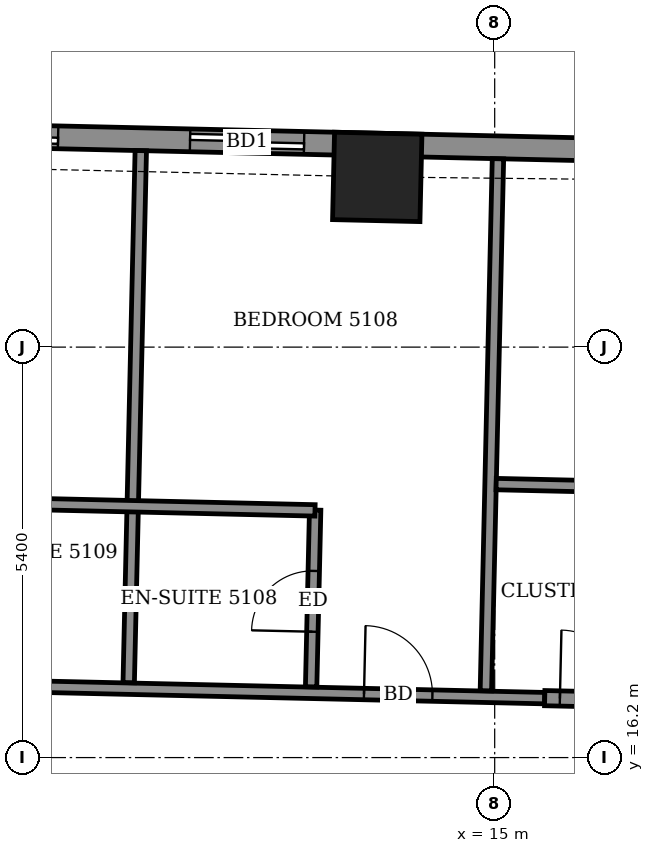
"""IFC4 building model, lengths in metres.
Left out: names, types, materials, properties, quantities, classifications, styles, units other than length and angle.
Written with IfcOpenShell. Run it as: python <this file> out.ifc"""

import sys

from ifc_helpers import new_model, si_unit, direction, frame, frame_2d, origin, origin_2d, place, context, subcontext, project, spatial, rectangle, extrude, element, fill, save


model = new_model("IFC4")
c1 = context("Model", 3, precision=1e-05, world=origin(), true_north=direction((0.0, 1.0)))
c2 = subcontext(c1, "Body", "Model", "MODEL_VIEW")
j1 = project(units=[si_unit("LENGTHUNIT", "METRE"), si_unit("PLANEANGLEUNIT", "RADIAN")], contexts=[c1])
p1 = place(None, origin())
s1 = spatial("IfcSite", under=j1, at=p1, CompositionType="ELEMENT")
p2 = place(p1, origin())
s2 = spatial("IfcBuilding", under=s1, at=p2, CompositionType="ELEMENT")
p3 = place(p2, frame((0.0, 0.0, 201.5)))
s3 = spatial("IfcBuildingStorey", under=s2, at=p3, CompositionType="ELEMENT", Elevation=201.5)
p4 = place(p3, frame((13.455, 23.839, -0.55), z_axis=(0.0, 0.0, 1.0), x_axis=(-0.999741400599, 0.022740534932, 0.0)))
e1 = element("IfcColumn", 1, at=p4, inside=s3, PredefinedType="COLUMN", context=c2, shape_type="SweptSolid", body=[
    extrude(rectangle(XDim=1.15, YDim=1.15, at=origin_2d()), origin(), (0.0, 0.0, 1.0), 3.6),
])
p5 = place(p3, frame((20.437, 24.106, 0.0), z_axis=(0.0, 0.0, 1.0), x_axis=(-0.999742506232, 0.022691875925, 0.0)))
e2 = element("IfcWall", 2, at=p5, inside=s3, PredefinedType="SOLIDWALL", context=c2, shape_type="SweptSolid", body=[
    extrude(rectangle(XDim=42.444, YDim=0.3, at=frame_2d((21.222, 0.0))), origin(), (0.0, 0.0, 1.0), 3.05),
])
p6 = place(p5, frame((2.287, 0.0, 0.0)))
e3 = element("IfcOpeningElement", 3, at=p6, cuts=e2, PredefinedType="OPENING", context=c2, shape_type="SweptSolid", body=[
    extrude(rectangle(XDim=1.5, YDim=2.4, at=frame_2d((0.75, 1.2))), frame((0.0, 0.16, 0.0), z_axis=(0.0, -1.0, 0.0), x_axis=(1.0, 0.0, 0.0)), (0.0, 0.0, 1.0), 0.32),
])
p7 = place(p5, frame((7.947, 0.0, 0.0)))
e4 = element("IfcOpeningElement", 4, at=p7, cuts=e2, PredefinedType="OPENING", context=c2, shape_type="SweptSolid", body=[
    extrude(rectangle(XDim=1.5, YDim=2.4, at=frame_2d((0.75, 1.2))), frame((0.0, 0.16, 0.0), z_axis=(0.0, -1.0, 0.0), x_axis=(1.0, 0.0, 0.0)), (0.0, 0.0, 1.0), 0.32),
])
p8 = place(p5, frame((11.184, 0.0, 0.0)))
e5 = element("IfcOpeningElement", 5, at=p8, cuts=e2, PredefinedType="OPENING", context=c2, shape_type="SweptSolid", body=[
    extrude(rectangle(XDim=1.5, YDim=2.4, at=frame_2d((0.75, 1.2))), frame((0.0, 0.16, 0.0), z_axis=(0.0, -1.0, 0.0), x_axis=(1.0, 0.0, 0.0)), (0.0, 0.0, 1.0), 0.32),
])
p9 = place(p5, frame((16.469, 0.0, 0.0)))
e6 = element("IfcOpeningElement", 6, at=p9, cuts=e2, PredefinedType="OPENING", context=c2, shape_type="SweptSolid", body=[
    extrude(rectangle(XDim=1.5, YDim=2.4, at=frame_2d((0.75, 1.2))), frame((0.0, 0.16, 0.0), z_axis=(0.0, -1.0, 0.0), x_axis=(1.0, 0.0, 0.0)), (0.0, 0.0, 1.0), 0.32),
])
p10 = place(p5, frame((22.02, 0.0, 0.0)))
e7 = element("IfcOpeningElement", 7, at=p10, cuts=e2, PredefinedType="OPENING", context=c2, shape_type="SweptSolid", body=[
    extrude(rectangle(XDim=1.5, YDim=2.4, at=frame_2d((0.75, 1.2))), frame((0.0, 0.16, 0.0), z_axis=(0.0, -1.0, 0.0), x_axis=(1.0, 0.0, 0.0)), (0.0, 0.0, 1.0), 0.32),
])
p11 = place(p5, frame((25.257, 0.0, 0.0)))
e8 = element("IfcOpeningElement", 8, at=p11, cuts=e2, PredefinedType="OPENING", context=c2, shape_type="SweptSolid", body=[
    extrude(rectangle(XDim=1.5, YDim=2.4, at=frame_2d((0.75, 1.2))), frame((0.0, 0.16, 0.0), z_axis=(0.0, -1.0, 0.0), x_axis=(1.0, 0.0, 0.0)), (0.0, 0.0, 1.0), 0.32),
])
p12 = place(p5, frame((30.057, 0.0, 0.0)))
e9 = element("IfcOpeningElement", 9, at=p12, cuts=e2, PredefinedType="OPENING", context=c2, shape_type="SweptSolid", body=[
    extrude(rectangle(XDim=1.5, YDim=2.4, at=frame_2d((0.75, 1.2))), frame((0.0, 0.16, 0.0), z_axis=(0.0, -1.0, 0.0), x_axis=(1.0, 0.0, 0.0)), (0.0, 0.0, 1.0), 0.32),
])
p13 = place(p5, frame((33.294, 0.0, 0.0)))
e10 = element("IfcOpeningElement", 10, at=p13, cuts=e2, PredefinedType="OPENING", context=c2, shape_type="SweptSolid", body=[
    extrude(rectangle(XDim=1.5, YDim=2.4, at=frame_2d((0.75, 1.2))), frame((0.0, 0.16, 0.0), z_axis=(0.0, -1.0, 0.0), x_axis=(1.0, 0.0, 0.0)), (0.0, 0.0, 1.0), 0.32),
])
p14 = place(p5, frame((38.484, 0.0, 0.9)))
e11 = element("IfcOpeningElement", 11, at=p14, cuts=e2, PredefinedType="OPENING", context=c2, shape_type="SweptSolid", body=[
    extrude(rectangle(XDim=2.4, YDim=1.5, at=frame_2d((1.2, 0.75))), frame((0.0, 0.16, 0.0), z_axis=(0.0, -1.0, 0.0), x_axis=(1.0, 0.0, 0.0)), (0.0, 0.0, 1.0), 0.32),
])
p15 = place(p3, frame((-14.871, 17.675, 0.0), z_axis=(0.0, 0.0, 1.0), x_axis=(0.999742359486, -0.02269834024, 0.0)))
e12 = element("IfcWall", 12, at=p15, inside=s3, PredefinedType="PARTITIONING", context=c2, shape_type="SweptSolid", body=[
    extrude(rectangle(XDim=30.536, YDim=0.15, at=frame_2d((15.268, 0.0))), origin(), (0.0, 0.0, 1.0), 3.05),
])
p16 = place(p15, frame((28.159, 0.0, 0.0)))
e13 = element("IfcOpeningElement", 13, at=p16, cuts=e12, PredefinedType="OPENING", context=c2, shape_type="SweptSolid", body=[
    extrude(rectangle(XDim=0.9, YDim=2.1, at=frame_2d((0.45, 1.05))), frame((0.0, 0.085, 0.0), z_axis=(0.0, -1.0, 0.0), x_axis=(1.0, 0.0, 0.0)), (0.0, 0.0, 1.0), 0.17),
])
p17 = place(p15, frame((21.034, 0.0, 0.0)))
e14 = element("IfcOpeningElement", 14, at=p17, cuts=e12, PredefinedType="OPENING", context=c2, shape_type="SweptSolid", body=[
    extrude(rectangle(XDim=0.9, YDim=2.1, at=frame_2d((0.45, 1.05))), frame((0.0, 0.085, 0.0), z_axis=(0.0, -1.0, 0.0), x_axis=(1.0, 0.0, 0.0)), (0.0, 0.0, 1.0), 0.17),
])
p18 = place(p15, frame((18.684, 0.0, 0.0)))
e15 = element("IfcOpeningElement", 15, at=p18, cuts=e12, PredefinedType="OPENING", context=c2, shape_type="SweptSolid", body=[
    extrude(rectangle(XDim=0.9, YDim=2.1, at=frame_2d((0.45, 1.05))), frame((0.0, 0.085, 0.0), z_axis=(0.0, -1.0, 0.0), x_axis=(1.0, 0.0, 0.0)), (0.0, 0.0, 1.0), 0.17),
])
p19 = place(p15, frame((11.709, 0.0, 0.0)))
e16 = element("IfcOpeningElement", 16, at=p19, cuts=e12, PredefinedType="OPENING", context=c2, shape_type="SweptSolid", body=[
    extrude(rectangle(XDim=0.9, YDim=2.1, at=frame_2d((0.45, 1.05))), frame((0.0, 0.085, 0.0), z_axis=(0.0, -1.0, 0.0), x_axis=(1.0, 0.0, 0.0)), (0.0, 0.0, 1.0), 0.17),
])
p20 = place(p15, frame((9.734, 0.0, 0.0)))
e17 = element("IfcOpeningElement", 17, at=p20, cuts=e12, PredefinedType="OPENING", context=c2, shape_type="SweptSolid", body=[
    extrude(rectangle(XDim=0.9, YDim=2.1, at=frame_2d((0.45, 1.05))), frame((0.0, 0.085, 0.0), z_axis=(0.0, -1.0, 0.0), x_axis=(1.0, 0.0, 0.0)), (0.0, 0.0, 1.0), 0.17),
])
p21 = place(p15, frame((2.859, 0.0, 0.0)))
e18 = element("IfcOpeningElement", 18, at=p21, cuts=e12, PredefinedType="OPENING", context=c2, shape_type="SweptSolid", body=[
    extrude(rectangle(XDim=0.9, YDim=2.1, at=frame_2d((0.45, 1.05))), frame((0.0, 0.085, 0.0), z_axis=(0.0, -1.0, 0.0), x_axis=(1.0, 0.0, 0.0)), (0.0, 0.0, 1.0), 0.17),
])
p22 = place(p15, frame((0.584, 0.0, 0.0)))
e19 = element("IfcOpeningElement", 19, at=p22, cuts=e12, PredefinedType="OPENING", context=c2, shape_type="SweptSolid", body=[
    extrude(rectangle(XDim=0.9, YDim=2.1, at=frame_2d((0.45, 1.05))), frame((0.0, 0.085, 0.0), z_axis=(0.0, -1.0, 0.0), x_axis=(1.0, 0.0, 0.0)), (0.0, 0.0, 1.0), 0.17),
])
p23 = place(p3, frame((15.658, 16.982, 0.0), z_axis=(0.0, 0.0, 1.0), x_axis=(0.99974485859, -0.022587999516, 0.0)))
e20 = element("IfcWall", 20, at=p23, inside=s3, PredefinedType="PARTITIONING", context=c2, shape_type="SweptSolid", body=[
    extrude(rectangle(XDim=7.566, YDim=0.2, at=frame_2d((3.783, 0.0))), origin(), (0.0, 0.0, 1.0), 3.05),
])
p24 = place(p23, frame((4.794, 0.0, 0.0)))
e21 = element("IfcOpeningElement", 21, at=p24, cuts=e20, PredefinedType="OPENING", context=c2, shape_type="SweptSolid", body=[
    extrude(rectangle(XDim=1.0, YDim=2.1, at=frame_2d((0.5, 1.05))), frame((0.0, 0.11, 0.0), z_axis=(0.0, -1.0, 0.0), x_axis=(1.0, 0.0, 0.0)), (0.0, 0.0, 1.0), 0.22),
])
p25 = place(p23, frame((0.2, 0.0, 0.0)))
e22 = element("IfcOpeningElement", 22, at=p25, cuts=e20, PredefinedType="OPENING", context=c2, shape_type="SweptSolid", body=[
    extrude(rectangle(XDim=0.9, YDim=2.1, at=frame_2d((0.45, 1.05))), frame((0.0, 0.11, 0.0), z_axis=(0.0, -1.0, 0.0), x_axis=(1.0, 0.0, 0.0)), (0.0, 0.0, 1.0), 0.22),
])
p26 = place(p3, frame((10.185, 17.186, 0.0), z_axis=(0.0, 0.0, 1.0), x_axis=(0.022702393474, 0.999742267452, 0.0)))
e23 = element("IfcWall", 23, at=p26, inside=s3, PredefinedType="PARTITIONING", context=c2, shape_type="SweptSolid", body=[
    extrude(rectangle(XDim=7.001, YDim=0.15, at=frame_2d((3.5, 0.0))), origin(), (0.0, 0.0, 1.0), 2.55),
])
p27 = place(p3, frame((12.585, 17.131, 0.0), z_axis=(0.0, 0.0, 1.0), x_axis=(0.022781023197, 0.999740478815, 0.0)))
e24 = element("IfcWall", 24, at=p27, inside=s3, PredefinedType="PARTITIONING", context=c2, shape_type="SweptSolid", body=[
    extrude(rectangle(XDim=2.325, YDim=0.15, at=frame_2d((1.163, 0.0))), origin(), (0.0, 0.0, 1.0), 3.05),
])
p28 = place(p27, frame((0.725, 0.0, 0.0)))
e25 = element("IfcOpeningElement", 25, at=p28, cuts=e24, PredefinedType="OPENING", context=c2, shape_type="SweptSolid", body=[
    extrude(rectangle(XDim=0.8, YDim=2.1, at=frame_2d((0.4, 1.05))), frame((0.0, 0.085, 0.0), z_axis=(0.0, -1.0, 0.0), x_axis=(1.0, 0.0, 0.0)), (0.0, 0.0, 1.0), 0.17),
])
p29 = place(p3, frame((14.884, 17.079, 0.0), z_axis=(0.0, 0.0, 1.0), x_axis=(0.022703185001, 0.999742249478, 0.0)))
e26 = element("IfcWall", 26, at=p29, inside=s3, PredefinedType="PARTITIONING", context=c2, shape_type="SweptSolid", body=[
    extrude(rectangle(XDim=7.0, YDim=0.15, at=frame_2d((3.5, 0.0))), origin(), (0.0, 0.0, 1.0), 2.55),
])
p30 = place(p3, frame((7.837, 19.561, 0.0), z_axis=(0.0, 0.0, 1.0), x_axis=(0.99974154664, -0.022734113616, 0.0)))
e27 = element("IfcWall", 27, at=p30, inside=s3, PredefinedType="PARTITIONING", context=c2, shape_type="SweptSolid", body=[
    extrude(rectangle(XDim=4.8, YDim=0.15, at=frame_2d((2.4, 0.0))), origin(), (0.0, 0.0, 1.0), 3.05),
])
p31 = place(p3, frame((15.019, 19.798, 0.0), z_axis=(0.0, 0.0, 1.0), x_axis=(0.999740260747, -0.02279059109, 0.0)))
e28 = element("IfcWall", 28, at=p31, inside=s3, PredefinedType="PARTITIONING", context=c2, shape_type="SweptSolid", body=[
    extrude(rectangle(XDim=2.324, YDim=0.15, at=frame_2d((1.162, 0.0))), origin(), (0.0, 0.0, 1.0), 3.05),
])
p32 = place(p7, origin())
e29 = element("IfcDoor", 29, at=p32, inside=s3, OperationType="SLIDING_TO_LEFT", PredefinedType="DOOR", context=c2, shape_type="SweptSolid", body=[
    extrude(rectangle(XDim=1.5, YDim=2.4, at=frame_2d((0.75, 1.2))), frame((0.0, 0.025, 0.0), z_axis=(0.0, -1.0, 0.0), x_axis=(1.0, 0.0, 0.0)), (0.0, 0.0, 1.0), 0.05),
])
fill(e4, e29)
p33 = place(p8, origin())
e30 = element("IfcDoor", 30, at=p33, inside=s3, OperationType="SLIDING_TO_LEFT", PredefinedType="DOOR", context=c2, shape_type="SweptSolid", body=[
    extrude(rectangle(XDim=1.5, YDim=2.4, at=frame_2d((0.75, 1.2))), frame((0.0, 0.025, 0.0), z_axis=(0.0, -1.0, 0.0), x_axis=(1.0, 0.0, 0.0)), (0.0, 0.0, 1.0), 0.05),
])
fill(e5, e30)
p34 = place(p25, origin())
e31 = element("IfcDoor", 31, at=p34, inside=s3, OperationType="SINGLE_SWING_LEFT", PredefinedType="DOOR", context=c2, shape_type="SweptSolid", body=[
    extrude(rectangle(XDim=0.9, YDim=2.1, at=frame_2d((0.45, 1.05))), frame((0.0, 0.025, 0.0), z_axis=(0.0, -1.0, 0.0), x_axis=(1.0, 0.0, 0.0)), (0.0, 0.0, 1.0), 0.05),
])
fill(e22, e31)
p35 = place(p16, origin())
e32 = element("IfcDoor", 32, at=p35, inside=s3, OperationType="SINGLE_SWING_RIGHT", PredefinedType="DOOR", context=c2, shape_type="SweptSolid", body=[
    extrude(rectangle(XDim=0.9, YDim=2.1, at=frame_2d((0.45, 1.05))), frame((0.0, 0.025, 0.0), z_axis=(0.0, -1.0, 0.0), x_axis=(1.0, 0.0, 0.0)), (0.0, 0.0, 1.0), 0.05),
])
fill(e13, e32)
p36 = place(p28, origin())
e33 = element("IfcDoor", 33, at=p36, inside=s3, OperationType="SINGLE_SWING_RIGHT", PredefinedType="DOOR", context=c2, shape_type="SweptSolid", body=[
    extrude(rectangle(XDim=0.8, YDim=2.1, at=frame_2d((0.4, 1.05))), frame((0.0, 0.025, 0.0), z_axis=(0.0, -1.0, 0.0), x_axis=(1.0, 0.0, 0.0)), (0.0, 0.0, 1.0), 0.05),
])
fill(e25, e33)
save(model, sys.argv[1])
